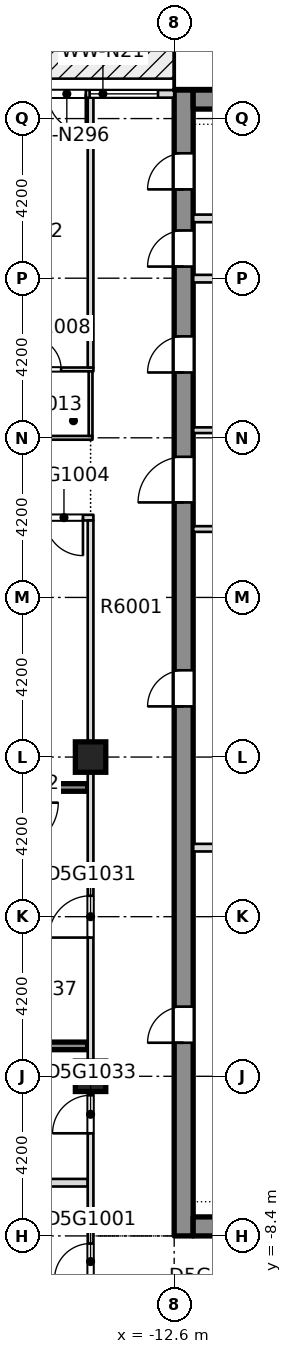
"""IFC4 building model, lengths in metres.
Left out: names, types, materials, properties, quantities, classifications, styles, units other than length and angle.
Written with IfcOpenShell. Run it as: python <this file> out.ifc"""

import sys

from ifc_helpers import new_model, si_unit, direction, frame, frame_2d, origin, origin_2d, place, context, subcontext, project, spatial, rectangle, extrude, element, fill, save


model = new_model("IFC4")
c1 = context("Model", 3, precision=1e-05, world=origin(), true_north=direction((0.0, 1.0)))
c2 = subcontext(c1, "Body", "Model", "MODEL_VIEW")
j1 = project(units=[si_unit("LENGTHUNIT", "METRE"), si_unit("PLANEANGLEUNIT", "RADIAN")], contexts=[c1])
p1 = place(None, origin())
s1 = spatial("IfcSite", under=j1, at=p1, CompositionType="ELEMENT")
p2 = place(p1, origin())
s2 = spatial("IfcBuilding", under=s1, at=p2, CompositionType="ELEMENT")
p3 = place(p2, frame((0.0, 0.0, 230.35)))
s3 = spatial("IfcBuildingStorey", under=s2, at=p3, CompositionType="ELEMENT", Elevation=230.35)
p4 = place(p3, frame((-12.35, -8.4, -0.4), z_axis=(0.0, 0.0, 1.0), x_axis=(0.0, 1.0, 0.0)))
e1 = element("IfcWall", 1, at=p4, inside=s3, PredefinedType="SHEAR", context=c2, shape_type="SweptSolid", body=[
    extrude(rectangle(XDim=30.15, YDim=0.5, at=frame_2d((15.075, 0.0))), origin(), (0.0, 0.0, 1.0), 3.45),
])
p5 = place(p4, frame((5.083, 0.0, 0.4)))
e2 = element("IfcOpeningElement", 2, at=p5, cuts=e1, PredefinedType="OPENING", context=c2, shape_type="SweptSolid", body=[
    extrude(rectangle(XDim=0.95, YDim=2.1, at=frame_2d((0.475, 1.05))), frame((0.0, 0.26, 0.0), z_axis=(0.0, -1.0, 0.0), x_axis=(1.0, 0.0, 0.0)), (0.0, 0.0, 1.0), 0.52),
])
p6 = place(p4, frame((13.933, 0.0, 0.4)))
e3 = element("IfcOpeningElement", 3, at=p6, cuts=e1, PredefinedType="OPENING", context=c2, shape_type="SweptSolid", body=[
    extrude(rectangle(XDim=0.95, YDim=2.1, at=frame_2d((0.475, 1.05))), frame((0.0, 0.26, 0.0), z_axis=(0.0, -1.0, 0.0), x_axis=(1.0, 0.0, 0.0)), (0.0, 0.0, 1.0), 0.52),
])
p7 = place(p4, frame((22.719, 0.0, 0.4)))
e4 = element("IfcOpeningElement", 4, at=p7, cuts=e1, PredefinedType="OPENING", context=c2, shape_type="SweptSolid", body=[
    extrude(rectangle(XDim=0.95, YDim=2.1, at=frame_2d((0.475, 1.05))), frame((0.0, 0.26, 0.0), z_axis=(0.0, -1.0, 0.0), x_axis=(1.0, 0.0, 0.0)), (0.0, 0.0, 1.0), 0.52),
])
p8 = place(p4, frame((25.506, 0.0, 0.4)))
e5 = element("IfcOpeningElement", 5, at=p8, cuts=e1, PredefinedType="OPENING", context=c2, shape_type="SweptSolid", body=[
    extrude(rectangle(XDim=0.95, YDim=2.1, at=frame_2d((0.475, 1.05))), frame((0.0, 0.26, 0.0), z_axis=(0.0, -1.0, 0.0), x_axis=(1.0, 0.0, 0.0)), (0.0, 0.0, 1.0), 0.52),
])
p9 = place(p4, frame((27.537, 0.0, 0.4)))
e6 = element("IfcOpeningElement", 6, at=p9, cuts=e1, PredefinedType="OPENING", context=c2, shape_type="SweptSolid", body=[
    extrude(rectangle(XDim=0.95, YDim=2.1, at=frame_2d((0.475, 1.05))), frame((0.0, 0.26, 0.0), z_axis=(0.0, -1.0, 0.0), x_axis=(1.0, 0.0, 0.0)), (0.0, 0.0, 1.0), 0.52),
])
p10 = place(p4, frame((19.3, 0.0, 0.4)))
e7 = element("IfcOpeningElement", 7, at=p10, cuts=e1, PredefinedType="OPENING", context=c2, shape_type="SweptSolid", body=[
    extrude(rectangle(XDim=1.2, YDim=2.1, at=frame_2d((0.6, 1.05))), frame((0.0, 0.26, 0.0), z_axis=(0.0, -1.0, 0.0), x_axis=(1.0, 0.0, 0.0)), (0.0, 0.0, 1.0), 0.52),
])
p11 = place(p3, frame((-12.1, -8.15, -0.4), z_axis=(0.0, 0.0, 1.0), x_axis=(1.0, 0.0, 0.0)))
e8 = element("IfcWall", 8, at=p11, inside=s3, PredefinedType="SHEAR", context=c2, shape_type="SweptSolid", body=[
    extrude(rectangle(XDim=24.2, YDim=0.5, at=frame_2d((12.1, 0.0))), origin(), (0.0, 0.0, 1.0), 3.45),
])
p12 = place(p11, frame((7.35, 0.0, 0.4)))
e9 = element("IfcOpeningElement", 9, at=p12, cuts=e8, PredefinedType="OPENING", context=c2, shape_type="SweptSolid", body=[
    extrude(rectangle(XDim=1.8, YDim=2.1, at=frame_2d((0.9, 1.05))), frame((0.0, 0.26, 0.0), z_axis=(0.0, -1.0, 0.0), x_axis=(1.0, 0.0, 0.0)), (0.0, 0.0, 1.0), 0.52),
])
p13 = place(p11, frame((15.05, 0.0, 0.4)))
e10 = element("IfcOpeningElement", 10, at=p13, cuts=e8, PredefinedType="OPENING", context=c2, shape_type="SweptSolid", body=[
    extrude(rectangle(XDim=1.8, YDim=2.1, at=frame_2d((0.9, 1.05))), frame((0.0, 0.26, 0.0), z_axis=(0.0, -1.0, 0.0), x_axis=(1.0, 0.0, 0.0)), (0.0, 0.0, 1.0), 0.52),
])
p14 = place(p3, frame((-12.1, 21.5, -0.4), z_axis=(0.0, 0.0, 1.0), x_axis=(1.0, 0.0, 0.0)))
e11 = element("IfcWall", 11, at=p14, inside=s3, PredefinedType="SHEAR", context=c2, shape_type="SweptSolid", body=[
    extrude(rectangle(XDim=24.2, YDim=0.5, at=frame_2d((12.1, 0.0))), origin(), (0.0, 0.0, 1.0), 3.45),
])
for number, where, z_axis, x_axis in (
    (12, (-14.8, -4.2, -0.4), (0.0, 0.0, 1.0), (1.0, 0.0, 0.0)),
    (13, (-14.8, 4.2, -0.4), (0.0, 0.0, 1.0), (1.0, 0.0, 0.0)),
):
    element("IfcColumn", number, at=place(p3, frame(where, z_axis=z_axis, x_axis=x_axis)), inside=s3, PredefinedType="COLUMN", context=c2, shape_type="SweptSolid", body=[
        extrude(rectangle(XDim=0.8, YDim=0.8, at=origin_2d()), origin(), (0.0, 0.0, 1.0), 3.45),
    ])
p15 = place(p3, frame((-25.75, -7.0, 0.0), z_axis=(0.0, 0.0, 1.0), x_axis=(1.0, 0.0, 0.0)))
e14 = element("IfcWall", 14, at=p15, inside=s3, PredefinedType="PARTITIONING", context=c2, shape_type="SweptSolid", body=[
    extrude(rectangle(XDim=10.875, YDim=0.2, at=frame_2d((5.438, 0.0))), origin(), (0.0, 0.0, 1.0), 3.05),
])
p16 = place(p3, frame((-20.45, 3.4, 0.0), z_axis=(0.0, 0.0, 1.0), x_axis=(1.0, 0.0, 0.0)))
e15 = element("IfcWall", 15, at=p16, inside=s3, PredefinedType="SOLIDWALL", context=c2, shape_type="SweptSolid", body=[
    extrude(rectangle(XDim=5.575, YDim=0.2, at=frame_2d((2.788, 0.0))), origin(), (0.0, 0.0, 1.0), 3.05),
])
p17 = place(p3, frame((-25.75, 10.5, 0.0), z_axis=(0.0, 0.0, 1.0), x_axis=(1.0, 0.0, 0.0)))
e16 = element("IfcWall", 16, at=p17, inside=s3, PredefinedType="PARTITIONING", context=c2, shape_type="SweptSolid", body=[
    extrude(rectangle(XDim=11.025, YDim=0.15, at=frame_2d((5.512, 0.0))), origin(), (0.0, 0.0, 1.0), 3.05),
])
p18 = place(p17, frame((9.75, 0.0, 0.0)))
e17 = element("IfcOpeningElement", 17, at=p18, cuts=e16, PredefinedType="OPENING", context=c2, shape_type="SweptSolid", body=[
    extrude(rectangle(XDim=1.0, YDim=2.1, at=frame_2d((0.5, 1.05))), frame((0.0, 0.085, 0.0), z_axis=(0.0, -1.0, 0.0), x_axis=(1.0, 0.0, 0.0)), (0.0, 0.0, 1.0), 0.17),
])
p19 = place(p3, frame((-17.25, 12.6, 0.0), z_axis=(0.0, 0.0, 1.0), x_axis=(1.0, 0.0, 0.0)))
e18 = element("IfcWall", 18, at=p19, inside=s3, PredefinedType="PARTITIONING", context=c2, shape_type="SweptSolid", body=[
    extrude(rectangle(XDim=2.5, YDim=0.1, at=frame_2d((1.25, 0.0))), origin(), (0.0, 0.0, 1.0), 3.05),
])
p20 = place(p3, frame((-17.25, 14.4, 0.0), z_axis=(0.0, 0.0, 1.0), x_axis=(1.0, 0.0, 0.0)))
e19 = element("IfcWall", 19, at=p20, inside=s3, PredefinedType="PARTITIONING", context=c2, shape_type="SweptSolid", body=[
    extrude(rectangle(XDim=2.525, YDim=0.1, at=frame_2d((1.262, 0.0))), origin(), (0.0, 0.0, 1.0), 3.05),
])
p21 = place(p20, frame((0.825, 0.0, 0.0)))
e20 = element("IfcOpeningElement", 20, at=p21, cuts=e19, PredefinedType="OPENING", context=c2, shape_type="SweptSolid", body=[
    extrude(rectangle(XDim=0.85, YDim=2.1, at=frame_2d((0.425, 1.05))), frame((0.0, 0.06, 0.0), z_axis=(0.0, -1.0, 0.0), x_axis=(1.0, 0.0, 0.0)), (0.0, 0.0, 1.0), 0.12),
])
p22 = place(p3, frame((-14.8, -10.38, 0.0), z_axis=(0.0, 0.0, 1.0), x_axis=(0.0, 1.0, 0.0)))
e21 = element("IfcWall", 21, at=p22, inside=s3, PredefinedType="PARTITIONING", context=c2, shape_type="SweptSolid", body=[
    extrude(rectangle(XDim=20.805, YDim=0.15, at=frame_2d((10.402, 0.0))), origin(), (0.0, 0.0, 1.0), 3.05),
])
p23 = place(p22, frame((0.83, 0.0, 0.0)))
e22 = element("IfcOpeningElement", 22, at=p23, cuts=e21, PredefinedType="OPENING", context=c2, shape_type="SweptSolid", body=[
    extrude(rectangle(XDim=0.95, YDim=2.1, at=frame_2d((0.475, 1.05))), frame((0.0, 0.085, 0.0), z_axis=(0.0, -1.0, 0.0), x_axis=(1.0, 0.0, 0.0)), (0.0, 0.0, 1.0), 0.17),
])
p24 = place(p22, frame((9.83, 0.0, 0.0)))
e23 = element("IfcOpeningElement", 23, at=p24, cuts=e21, PredefinedType="OPENING", context=c2, shape_type="SweptSolid", body=[
    extrude(rectangle(XDim=1.1, YDim=2.1, at=frame_2d((0.55, 1.05))), frame((0.0, 0.085, 0.0), z_axis=(0.0, -1.0, 0.0), x_axis=(1.0, 0.0, 0.0)), (0.0, 0.0, 1.0), 0.17),
])
p25 = place(p22, frame((4.68, 0.0, 0.0)))
e24 = element("IfcOpeningElement", 24, at=p25, cuts=e21, PredefinedType="OPENING", context=c2, shape_type="SweptSolid", body=[
    extrude(rectangle(XDim=1.0, YDim=2.1, at=frame_2d((0.5, 1.05))), frame((0.0, 0.085, 0.0), z_axis=(0.0, -1.0, 0.0), x_axis=(1.0, 0.0, 0.0)), (0.0, 0.0, 1.0), 0.17),
])
p26 = place(p3, frame((-14.8, 12.65, 0.0), z_axis=(0.0, 0.0, 1.0), x_axis=(0.0, 1.0, 0.0)))
e25 = element("IfcWall", 25, at=p26, inside=s3, PredefinedType="PARTITIONING", context=c2, shape_type="SweptSolid", body=[
    extrude(rectangle(XDim=1.7, YDim=0.1, at=frame_2d((0.85, 0.0))), origin(), (0.0, 0.0, 1.0), 3.05),
])
p27 = place(p3, frame((-14.8, 14.45, 0.0), z_axis=(0.0, 0.0, 1.0), x_axis=(0.0, 1.0, 0.0)))
e26 = element("IfcWall", 26, at=p27, inside=s3, PredefinedType="PARTITIONING", context=c2, shape_type="SweptSolid", body=[
    extrude(rectangle(XDim=7.1, YDim=0.15, at=frame_2d((3.55, 0.0))), origin(), (0.0, 0.0, 1.0), 3.05),
])
p28 = place(p3, frame((-12.6, 21.65, 0.0), z_axis=(0.0, 0.0, 1.0), x_axis=(-1.0, 0.0, 0.0)))
e27 = element("IfcWall", 27, at=p28, inside=s3, PredefinedType="STANDARD", context=c2, shape_type="SweptSolid", body=[
    extrude(rectangle(XDim=3.75, YDim=0.2, at=frame_2d((1.875, 0.0))), origin(), (0.0, 0.0, 1.0), 3.05),
])
p29 = place(p28, frame((0.425, 0.0, 0.2)))
e28 = element("IfcOpeningElement", 28, at=p29, cuts=e27, PredefinedType="OPENING", context=c2, shape_type="SweptSolid", body=[
    extrude(rectangle(XDim=1.8, YDim=2.65, at=frame_2d((0.9, 1.325))), frame((0.0, 0.11, 0.0), z_axis=(0.0, -1.0, 0.0), x_axis=(1.0, 0.0, 0.0)), (0.0, 0.0, 1.0), 0.22),
])
p30 = place(p28, frame((2.325, 0.0, 0.0)))
e29 = element("IfcOpeningElement", 29, at=p30, cuts=e27, PredefinedType="OPENING", context=c2, shape_type="SweptSolid", body=[
    extrude(rectangle(XDim=1.0, YDim=2.4, at=frame_2d((0.5, 1.2))), frame((0.0, 0.11, 0.0), z_axis=(0.0, -1.0, 0.0), x_axis=(1.0, 0.0, 0.0)), (0.0, 0.0, 1.0), 0.22),
])
p31 = place(p3, frame((-12.099, 1.816, 0.0), z_axis=(0.0, 0.0, 1.0), x_axis=(1.0, 0.0, 0.0)))
e30 = element("IfcWall", 30, at=p31, inside=s3, PredefinedType="PARTITIONING", context=c2, shape_type="SweptSolid", body=[
    extrude(rectangle(XDim=3.448, YDim=0.2, at=frame_2d((1.724, 0.0))), origin(), (0.0, 0.0, 1.0), 3.05),
])
for number, where, z_axis, x_axis in (
    (31, (-12.099, 10.2, 0.0), (0.0, 0.0, 1.0), (1.0, 0.0, 0.0)),
    (32, (-12.099, 12.8, 0.0), (0.0, 0.0, 1.0), (1.0, 0.0, 0.0)),
):
    element("IfcWall", number, at=place(p3, frame(where, z_axis=z_axis, x_axis=x_axis)), inside=s3, PredefinedType="PARTITIONING", context=c2, shape_type="SweptSolid", body=[
        extrude(rectangle(XDim=3.448, YDim=0.15, at=frame_2d((1.724, 0.0))), origin(), (0.0, 0.0, 1.0), 3.05),
    ])
for number, where, z_axis, x_axis in (
    (33, (-12.099, 16.788, 0.0), (0.0, 0.0, 1.0), (1.0, 0.0, 0.0)),
    (34, (-12.099, 18.373, 0.0), (0.0, 0.0, 1.0), (1.0, 0.0, 0.0)),
):
    element("IfcWall", number, at=place(p3, frame(where, z_axis=z_axis, x_axis=x_axis)), inside=s3, PredefinedType="PARTITIONING", context=c2, shape_type="SweptSolid", body=[
        extrude(rectangle(XDim=3.448, YDim=0.2, at=frame_2d((1.724, 0.0))), origin(), (0.0, 0.0, 1.0), 3.05),
    ])
p32 = place(p3, frame((-23.0, -3.4, 0.0), z_axis=(0.0, 0.0, 1.0), x_axis=(1.0, 0.0, 0.0)))
e35 = element("IfcWall", 35, at=p32, inside=s3, PredefinedType="SOLIDWALL", context=c2, shape_type="SweptSolid", body=[
    extrude(rectangle(XDim=8.123, YDim=0.2, at=frame_2d((4.062, 0.0))), origin(), (0.0, 0.0, 1.0), 3.05),
])
p33 = place(p23, origin())
e36 = element("IfcDoor", 36, at=p33, inside=s3, OperationType="SINGLE_SWING_LEFT", PredefinedType="DOOR", context=c2, shape_type="SweptSolid", body=[
    extrude(rectangle(XDim=0.95, YDim=2.1, at=frame_2d((0.475, 1.05))), frame((0.0, 0.025, 0.0), z_axis=(0.0, -1.0, 0.0), x_axis=(1.0, 0.0, 0.0)), (0.0, 0.0, 1.0), 0.05),
])
fill(e22, e36)
p34 = place(p18, origin())
e37 = element("IfcDoor", 37, at=p34, inside=s3, OperationType="SINGLE_SWING_RIGHT", PredefinedType="DOOR", context=c2, shape_type="SweptSolid", body=[
    extrude(rectangle(XDim=1.0, YDim=2.1, at=frame_2d((0.5, 1.05))), frame((0.0, 0.025, 0.0), z_axis=(0.0, -1.0, 0.0), x_axis=(1.0, 0.0, 0.0)), (0.0, 0.0, 1.0), 0.05),
])
fill(e17, e37)
p35 = place(p21, origin())
e38 = element("IfcDoor", 38, at=p35, inside=s3, OperationType="SINGLE_SWING_RIGHT", PredefinedType="DOOR", context=c2, shape_type="SweptSolid", body=[
    extrude(rectangle(XDim=0.85, YDim=2.1, at=frame_2d((0.425, 1.05))), frame((0.0, 0.025, 0.0), z_axis=(0.0, -1.0, 0.0), x_axis=(1.0, 0.0, 0.0)), (0.0, 0.0, 1.0), 0.05),
])
fill(e20, e38)
p36 = place(p24, origin())
e39 = element("IfcDoor", 39, at=p36, inside=s3, OperationType="SINGLE_SWING_RIGHT", PredefinedType="DOOR", context=c2, shape_type="SweptSolid", body=[
    extrude(rectangle(XDim=1.1, YDim=2.1, at=frame_2d((0.55, 1.05))), frame((0.0, 0.025, 0.0), z_axis=(0.0, -1.0, 0.0), x_axis=(1.0, 0.0, 0.0)), (0.0, 0.0, 1.0), 0.05),
])
fill(e23, e39)
p37 = place(p25, origin())
e40 = element("IfcDoor", 40, at=p37, inside=s3, OperationType="SINGLE_SWING_LEFT", PredefinedType="DOOR", context=c2, shape_type="SweptSolid", body=[
    extrude(rectangle(XDim=1.0, YDim=2.1, at=frame_2d((0.5, 1.05))), frame((0.0, 0.025, 0.0), z_axis=(0.0, -1.0, 0.0), x_axis=(1.0, 0.0, 0.0)), (0.0, 0.0, 1.0), 0.05),
])
fill(e24, e40)
p38 = place(p29, origin())
e41 = element("IfcWindow", 41, at=p38, inside=s3, PartitioningType="SINGLE_PANEL", PredefinedType="WINDOW", context=c2, shape_type="SweptSolid", body=[
    extrude(rectangle(XDim=1.8, YDim=2.65, at=frame_2d((0.9, 1.325))), frame((0.0, 0.03, 0.0), z_axis=(0.0, -1.0, 0.0), x_axis=(1.0, 0.0, 0.0)), (0.0, 0.0, 1.0), 0.06),
])
fill(e28, e41)
p39 = place(p30, origin())
e42 = element("IfcDoor", 42, at=p39, inside=s3, OperationType="SINGLE_SWING_LEFT", PredefinedType="DOOR", context=c2, shape_type="SweptSolid", body=[
    extrude(rectangle(XDim=1.0, YDim=2.4, at=frame_2d((0.5, 1.2))), frame((0.0, 0.025, 0.0), z_axis=(0.0, -1.0, 0.0), x_axis=(1.0, 0.0, 0.0)), (0.0, 0.0, 1.0), 0.05),
])
fill(e29, e42)
p40 = place(p5, origin())
e43 = element("IfcDoor", 43, at=p40, inside=s3, OperationType="SINGLE_SWING_LEFT", PredefinedType="DOOR", context=c2, shape_type="SweptSolid", body=[
    extrude(rectangle(XDim=0.95, YDim=2.1, at=frame_2d((0.475, 1.05))), frame((0.0, 0.025, 0.0), z_axis=(0.0, -1.0, 0.0), x_axis=(1.0, 0.0, 0.0)), (0.0, 0.0, 1.0), 0.05),
])
fill(e2, e43)
p41 = place(p6, origin())
e44 = element("IfcDoor", 44, at=p41, inside=s3, OperationType="SINGLE_SWING_LEFT", PredefinedType="DOOR", context=c2, shape_type="SweptSolid", body=[
    extrude(rectangle(XDim=0.95, YDim=2.1, at=frame_2d((0.475, 1.05))), frame((0.0, 0.025, 0.0), z_axis=(0.0, -1.0, 0.0), x_axis=(1.0, 0.0, 0.0)), (0.0, 0.0, 1.0), 0.05),
])
fill(e3, e44)
p42 = place(p7, origin())
e45 = element("IfcDoor", 45, at=p42, inside=s3, OperationType="SINGLE_SWING_LEFT", PredefinedType="DOOR", context=c2, shape_type="SweptSolid", body=[
    extrude(rectangle(XDim=0.95, YDim=2.1, at=frame_2d((0.475, 1.05))), frame((0.0, 0.025, 0.0), z_axis=(0.0, -1.0, 0.0), x_axis=(1.0, 0.0, 0.0)), (0.0, 0.0, 1.0), 0.05),
])
fill(e4, e45)
p43 = place(p8, origin())
e46 = element("IfcDoor", 46, at=p43, inside=s3, OperationType="SINGLE_SWING_LEFT", PredefinedType="DOOR", context=c2, shape_type="SweptSolid", body=[
    extrude(rectangle(XDim=0.95, YDim=2.1, at=frame_2d((0.475, 1.05))), frame((0.0, 0.025, 0.0), z_axis=(0.0, -1.0, 0.0), x_axis=(1.0, 0.0, 0.0)), (0.0, 0.0, 1.0), 0.05),
])
fill(e5, e46)
p44 = place(p9, origin())
e47 = element("IfcDoor", 47, at=p44, inside=s3, OperationType="SINGLE_SWING_LEFT", PredefinedType="DOOR", context=c2, shape_type="SweptSolid", body=[
    extrude(rectangle(XDim=0.95, YDim=2.1, at=frame_2d((0.475, 1.05))), frame((0.0, 0.025, 0.0), z_axis=(0.0, -1.0, 0.0), x_axis=(1.0, 0.0, 0.0)), (0.0, 0.0, 1.0), 0.05),
])
fill(e6, e47)
p45 = place(p10, origin())
e48 = element("IfcDoor", 48, at=p45, inside=s3, OperationType="SINGLE_SWING_LEFT", PredefinedType="DOOR", context=c2, shape_type="SweptSolid", body=[
    extrude(rectangle(XDim=1.2, YDim=2.1, at=frame_2d((0.6, 1.05))), frame((0.0, 0.025, 0.0), z_axis=(0.0, -1.0, 0.0), x_axis=(1.0, 0.0, 0.0)), (0.0, 0.0, 1.0), 0.05),
])
fill(e7, e48)
save(model, sys.argv[1])
